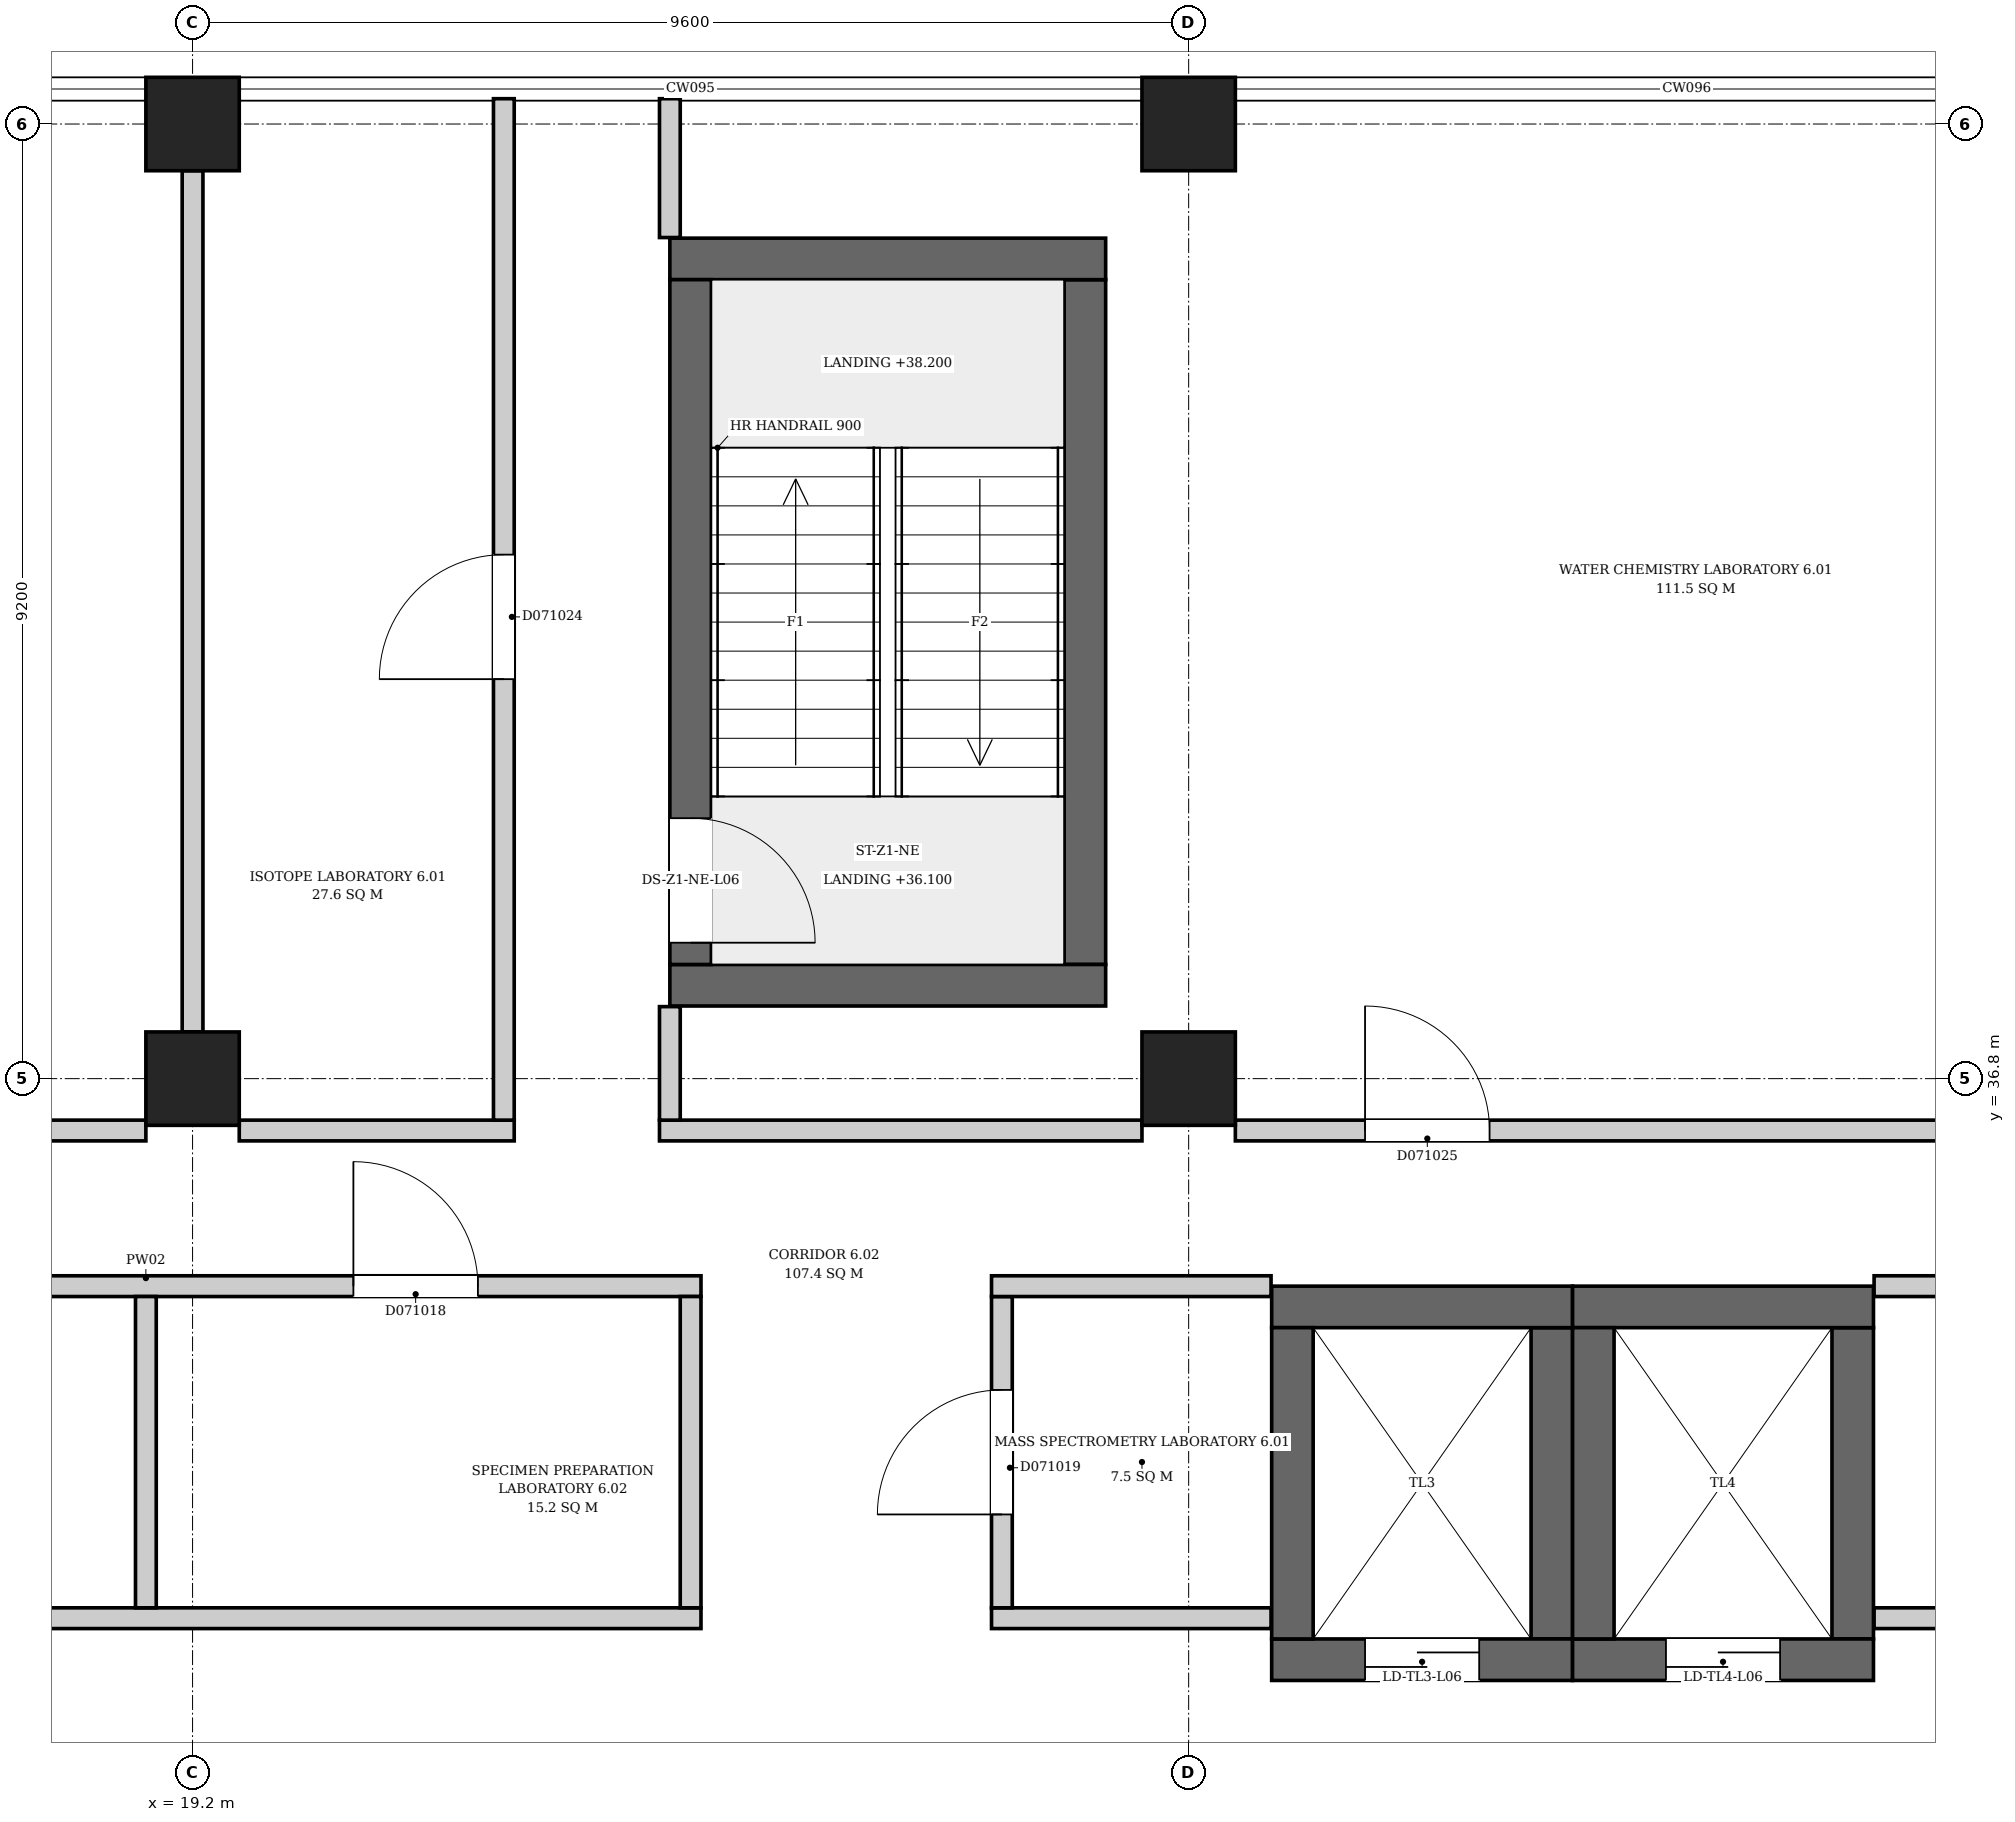
"""IFC4 building model, lengths in metres.
Left out: names, types, materials, properties, quantities, classifications, styles, units other than length and angle.
Written with IfcOpenShell. Run it as: python <this file> out.ifc"""

import sys

from ifc_helpers import new_model, si_unit, direction, frame, frame_2d, origin, origin_2d, place, context, subcontext, project, spatial, rectangle, extrude, element, fill, save


model = new_model("IFC4")
c1 = context("Model", 3, precision=1e-05, world=origin(), true_north=direction((0.0, 1.0)))
c2 = subcontext(c1, "Body", "Model", "MODEL_VIEW")
j1 = project(units=[si_unit("LENGTHUNIT", "METRE"), si_unit("PLANEANGLEUNIT", "RADIAN")], contexts=[c1])
p1 = place(None, origin())
s1 = spatial("IfcSite", under=j1, at=p1, CompositionType="ELEMENT")
p2 = place(p1, origin())
s2 = spatial("IfcBuilding", under=s1, at=p2, CompositionType="ELEMENT")
p3 = place(p2, frame((0.0, 0.0, 36.1)))
s3 = spatial("IfcBuildingStorey", under=s2, at=p3, CompositionType="ELEMENT", Elevation=36.1)
for number, where, z_axis, x_axis in (
    (1, (23.8, 37.7, 0.0), (0.0, 0.0, 1.0), (1.0, 0.0, 0.0)),
    (2, (23.8, 44.7, 0.0), (0.0, 0.0, 1.0), (1.0, 0.0, 0.0)),
):
    element("IfcWall", number, at=place(p3, frame(where, z_axis=z_axis, x_axis=x_axis)), inside=s3, PredefinedType="SHEAR", context=c2, shape_type="SweptSolid", body=[
        extrude(rectangle(XDim=4.2, YDim=0.4, at=frame_2d((2.1, 0.0))), origin(), (0.0, 0.0, 1.0), 4.2),
    ])
p4 = place(p3, frame((24.0, 37.9, 0.0), z_axis=(0.0, 0.0, 1.0), x_axis=(0.0, 1.0, 0.0)))
e3 = element("IfcWall", 3, at=p4, inside=s3, PredefinedType="SHEAR", context=c2, shape_type="SweptSolid", body=[
    extrude(rectangle(XDim=6.6, YDim=0.4, at=frame_2d((3.3, 0.0))), origin(), (0.0, 0.0, 1.0), 4.2),
])
p5 = place(p4, frame((0.21, 0.0, 0.0)))
e4 = element("IfcOpeningElement", 4, at=p5, cuts=e3, PredefinedType="OPENING", context=c2, shape_type="SweptSolid", body=[
    extrude(rectangle(XDim=1.2, YDim=2.1, at=frame_2d((0.6, 1.05))), frame((0.0, 0.21, 0.0), z_axis=(0.0, -1.0, 0.0), x_axis=(1.0, 0.0, 0.0)), (0.0, 0.0, 1.0), 0.42),
])
p6 = place(p3, frame((27.8, 37.9, 0.0), z_axis=(0.0, 0.0, 1.0), x_axis=(0.0, 1.0, 0.0)))
e5 = element("IfcWall", 5, at=p6, inside=s3, PredefinedType="SHEAR", context=c2, shape_type="SweptSolid", body=[
    extrude(rectangle(XDim=6.6, YDim=0.4, at=frame_2d((3.3, 0.0))), origin(), (0.0, 0.0, 1.0), 4.2),
])
p7 = place(p3, frame((29.6, 31.2, 0.0), z_axis=(0.0, 0.0, 1.0), x_axis=(1.0, 0.0, 0.0)))
e6 = element("IfcWall", 6, at=p7, inside=s3, PredefinedType="SHEAR", context=c2, shape_type="SweptSolid", body=[
    extrude(rectangle(XDim=2.9, YDim=0.4, at=frame_2d((1.45, 0.0))), origin(), (0.0, 0.0, 1.0), 4.2),
])
p8 = place(p7, frame((0.9, 0.0, 0.0)))
e7 = element("IfcOpeningElement", 7, at=p8, cuts=e6, PredefinedType="OPENING", context=c2, shape_type="SweptSolid", body=[
    extrude(rectangle(XDim=1.1, YDim=2.1, at=frame_2d((0.55, 1.05))), frame((0.0, 0.21, 0.0), z_axis=(0.0, -1.0, 0.0), x_axis=(1.0, 0.0, 0.0)), (0.0, 0.0, 1.0), 0.42),
])
p9 = place(p3, frame((29.6, 34.6, 0.0), z_axis=(0.0, 0.0, 1.0), x_axis=(1.0, 0.0, 0.0)))
e8 = element("IfcWall", 8, at=p9, inside=s3, PredefinedType="SHEAR", context=c2, shape_type="SweptSolid", body=[
    extrude(rectangle(XDim=2.9, YDim=0.4, at=frame_2d((1.45, 0.0))), origin(), (0.0, 0.0, 1.0), 4.2),
])
for number, where, z_axis, x_axis in (
    (9, (29.8, 31.4, 0.0), (0.0, 0.0, 1.0), (0.0, 1.0, 0.0)),
    (10, (32.3, 31.4, 0.0), (0.0, 0.0, 1.0), (0.0, 1.0, 0.0)),
):
    element("IfcWall", number, at=place(p3, frame(where, z_axis=z_axis, x_axis=x_axis)), inside=s3, PredefinedType="SHEAR", context=c2, shape_type="SweptSolid", body=[
        extrude(rectangle(XDim=3.0, YDim=0.4, at=frame_2d((1.5, 0.0))), origin(), (0.0, 0.0, 1.0), 4.2),
    ])
p10 = place(p3, frame((32.5, 31.2, 0.0), z_axis=(0.0, 0.0, 1.0), x_axis=(1.0, 0.0, 0.0)))
e11 = element("IfcWall", 11, at=p10, inside=s3, PredefinedType="SHEAR", context=c2, shape_type="SweptSolid", body=[
    extrude(rectangle(XDim=2.9, YDim=0.4, at=frame_2d((1.45, 0.0))), origin(), (0.0, 0.0, 1.0), 4.2),
])
p11 = place(p10, frame((0.9, 0.0, 0.0)))
e12 = element("IfcOpeningElement", 12, at=p11, cuts=e11, PredefinedType="OPENING", context=c2, shape_type="SweptSolid", body=[
    extrude(rectangle(XDim=1.1, YDim=2.1, at=frame_2d((0.55, 1.05))), frame((0.0, 0.21, 0.0), z_axis=(0.0, -1.0, 0.0), x_axis=(1.0, 0.0, 0.0)), (0.0, 0.0, 1.0), 0.42),
])
p12 = place(p3, frame((32.5, 34.6, 0.0), z_axis=(0.0, 0.0, 1.0), x_axis=(1.0, 0.0, 0.0)))
e13 = element("IfcWall", 13, at=p12, inside=s3, PredefinedType="SHEAR", context=c2, shape_type="SweptSolid", body=[
    extrude(rectangle(XDim=2.9, YDim=0.4, at=frame_2d((1.45, 0.0))), origin(), (0.0, 0.0, 1.0), 4.2),
])
for number, where, z_axis, x_axis in (
    (14, (32.7, 31.4, 0.0), (0.0, 0.0, 1.0), (0.0, 1.0, 0.0)),
    (15, (35.2, 31.4, 0.0), (0.0, 0.0, 1.0), (0.0, 1.0, 0.0)),
):
    element("IfcWall", number, at=place(p3, frame(where, z_axis=z_axis, x_axis=x_axis)), inside=s3, PredefinedType="SHEAR", context=c2, shape_type="SweptSolid", body=[
        extrude(rectangle(XDim=3.0, YDim=0.4, at=frame_2d((1.5, 0.0))), origin(), (0.0, 0.0, 1.0), 4.2),
    ])
for number, where, z_axis, x_axis in (
    (16, (19.2, 36.8, 0.0), (0.0, 0.0, 1.0), (1.0, 0.0, 0.0)),
    (17, (28.8, 36.8, 0.0), (0.0, 0.0, 1.0), (1.0, 0.0, 0.0)),
    (18, (19.2, 46.0, 0.0), (0.0, 0.0, 1.0), (1.0, 0.0, 0.0)),
    (19, (28.8, 46.0, 0.0), (0.0, 0.0, 1.0), (1.0, 0.0, 0.0)),
):
    element("IfcColumn", number, at=place(p3, frame(where, z_axis=z_axis, x_axis=x_axis)), inside=s3, PredefinedType="COLUMN", context=c2, shape_type="SweptSolid", body=[
        extrude(rectangle(XDim=0.9, YDim=0.9, at=origin_2d()), origin(), (0.0, 0.0, 1.0), 4.2),
    ])
p13 = place(p3, frame((11.2, 36.3, 0.0), z_axis=(0.0, 0.0, 1.0), x_axis=(1.0, 0.0, 0.0)))
e20 = element("IfcWall", 20, at=p13, inside=s3, PredefinedType="PARTITIONING", context=c2, shape_type="SweptSolid", body=[
    extrude(rectangle(XDim=7.55, YDim=0.2, at=frame_2d((3.775, 0.0))), origin(), (0.0, 0.0, 1.0), 3.9),
])
p14 = place(p3, frame((13.4, 34.8, 0.0), z_axis=(0.0, 0.0, 1.0), x_axis=(1.0, 0.0, 0.0)))
e21 = element("IfcWall", 21, at=p14, inside=s3, PredefinedType="PARTITIONING", context=c2, shape_type="SweptSolid", body=[
    extrude(rectangle(XDim=10.7, YDim=0.2, at=frame_2d((5.35, 0.0))), origin(), (0.0, 0.0, 1.0), 3.9),
])
p15 = place(p14, frame((2.1, 0.0, 0.0)))
e22 = element("IfcOpeningElement", 22, at=p15, cuts=e21, PredefinedType="OPENING", context=c2, shape_type="SweptSolid", body=[
    extrude(rectangle(XDim=1.2, YDim=2.1, at=frame_2d((0.6, 1.05))), frame((0.0, 0.11, 0.0), z_axis=(0.0, -1.0, 0.0), x_axis=(1.0, 0.0, 0.0)), (0.0, 0.0, 1.0), 0.22),
])
p16 = place(p14, frame((7.35, 0.0, 0.0)))
e23 = element("IfcOpeningElement", 23, at=p16, cuts=e21, PredefinedType="OPENING", context=c2, shape_type="SweptSolid", body=[
    extrude(rectangle(XDim=1.2, YDim=2.1, at=frame_2d((0.6, 1.05))), frame((0.0, 0.11, 0.0), z_axis=(0.0, -1.0, 0.0), x_axis=(1.0, 0.0, 0.0)), (0.0, 0.0, 1.0), 0.22),
])
p17 = place(p3, frame((13.506, 31.6, 0.0), z_axis=(0.0, 0.0, 1.0), x_axis=(1.0, 0.0, 0.0)))
e24 = element("IfcWall", 24, at=p17, inside=s3, PredefinedType="PARTITIONING", context=c2, shape_type="SweptSolid", body=[
    extrude(rectangle(XDim=10.594, YDim=0.2, at=frame_2d((5.297, 0.0))), origin(), (0.0, 0.0, 1.0), 3.9),
])
p18 = place(p3, frame((18.75, 31.7, 0.0), z_axis=(0.0, 0.0, 1.0), x_axis=(0.0, 1.0, 0.0)))
e25 = element("IfcWall", 25, at=p18, inside=s3, PredefinedType="PARTITIONING", context=c2, shape_type="SweptSolid", body=[
    extrude(rectangle(XDim=3.0, YDim=0.2, at=frame_2d((1.5, 0.0))), origin(), (0.0, 0.0, 1.0), 3.9),
])
p19 = place(p3, frame((19.2, 37.25, 0.0), z_axis=(0.0, 0.0, 1.0), x_axis=(0.0, 1.0, 0.0)))
e26 = element("IfcWall", 26, at=p19, inside=s3, PredefinedType="PARTITIONING", context=c2, shape_type="SweptSolid", body=[
    extrude(rectangle(XDim=8.3, YDim=0.2, at=frame_2d((4.15, 0.0))), origin(), (0.0, 0.0, 1.0), 3.9),
])
p20 = place(p3, frame((19.65, 36.3, 0.0), z_axis=(0.0, 0.0, 1.0), x_axis=(1.0, 0.0, 0.0)))
e27 = element("IfcWall", 27, at=p20, inside=s3, PredefinedType="PARTITIONING", context=c2, shape_type="SweptSolid", body=[
    extrude(rectangle(XDim=2.65, YDim=0.2, at=frame_2d((1.325, 0.0))), origin(), (0.0, 0.0, 1.0), 3.9),
])
p21 = place(p3, frame((22.2, 36.4, 0.0), z_axis=(0.0, 0.0, 1.0), x_axis=(0.0, 1.0, 0.0)))
e28 = element("IfcWall", 28, at=p21, inside=s3, PredefinedType="PARTITIONING", context=c2, shape_type="SweptSolid", body=[
    extrude(rectangle(XDim=9.844, YDim=0.2, at=frame_2d((4.922, 0.0))), origin(), (0.0, 0.0, 1.0), 3.9),
])
p22 = place(p21, frame((4.25, 0.0, 0.0)))
e29 = element("IfcOpeningElement", 29, at=p22, cuts=e28, PredefinedType="OPENING", context=c2, shape_type="SweptSolid", body=[
    extrude(rectangle(XDim=1.2, YDim=2.1, at=frame_2d((0.6, 1.05))), frame((0.0, 0.11, 0.0), z_axis=(0.0, -1.0, 0.0), x_axis=(1.0, 0.0, 0.0)), (0.0, 0.0, 1.0), 0.22),
])
p23 = place(p3, frame((23.7, 36.3, 0.0), z_axis=(0.0, 0.0, 1.0), x_axis=(1.0, 0.0, 0.0)))
e30 = element("IfcWall", 30, at=p23, inside=s3, PredefinedType="PARTITIONING", context=c2, shape_type="SweptSolid", body=[
    extrude(rectangle(XDim=4.65, YDim=0.2, at=frame_2d((2.325, 0.0))), origin(), (0.0, 0.0, 1.0), 3.9),
])
p24 = place(p3, frame((23.8, 36.4, 0.0), z_axis=(0.0, 0.0, 1.0), x_axis=(0.0, 1.0, 0.0)))
e31 = element("IfcWall", 31, at=p24, inside=s3, PredefinedType="PARTITIONING", context=c2, shape_type="SweptSolid", body=[
    extrude(rectangle(XDim=1.094, YDim=0.2, at=frame_2d((0.547, 0.0))), origin(), (0.0, 0.0, 1.0), 3.9),
])
p25 = place(p3, frame((23.8, 44.906, 0.0), z_axis=(0.0, 0.0, 1.0), x_axis=(0.0, 1.0, 0.0)))
e32 = element("IfcWall", 32, at=p25, inside=s3, PredefinedType="PARTITIONING", context=c2, shape_type="SweptSolid", body=[
    extrude(rectangle(XDim=1.338, YDim=0.2, at=frame_2d((0.669, 0.0))), origin(), (0.0, 0.0, 1.0), 3.9),
])
p26 = place(p3, frame((24.0, 31.7, 0.0), z_axis=(0.0, 0.0, 1.0), x_axis=(0.0, 1.0, 0.0)))
e33 = element("IfcWall", 33, at=p26, inside=s3, PredefinedType="PARTITIONING", context=c2, shape_type="SweptSolid", body=[
    extrude(rectangle(XDim=3.0, YDim=0.2, at=frame_2d((1.5, 0.0))), origin(), (0.0, 0.0, 1.0), 3.9),
])
p27 = place(p3, frame((26.9, 31.6, 0.0), z_axis=(0.0, 0.0, 1.0), x_axis=(1.0, 0.0, 0.0)))
e34 = element("IfcWall", 34, at=p27, inside=s3, PredefinedType="PARTITIONING", context=c2, shape_type="SweptSolid", body=[
    extrude(rectangle(XDim=2.694, YDim=0.2, at=frame_2d((1.347, 0.0))), origin(), (0.0, 0.0, 1.0), 3.9),
])
p28 = place(p3, frame((27.0, 31.7, 0.0), z_axis=(0.0, 0.0, 1.0), x_axis=(0.0, 1.0, 0.0)))
e35 = element("IfcWall", 35, at=p28, inside=s3, PredefinedType="PARTITIONING", context=c2, shape_type="SweptSolid", body=[
    extrude(rectangle(XDim=3.0, YDim=0.2, at=frame_2d((1.5, 0.0))), origin(), (0.0, 0.0, 1.0), 3.9),
])
p29 = place(p28, frame((0.9, 0.0, 0.0)))
e36 = element("IfcOpeningElement", 36, at=p29, cuts=e35, PredefinedType="OPENING", context=c2, shape_type="SweptSolid", body=[
    extrude(rectangle(XDim=1.2, YDim=2.1, at=frame_2d((0.6, 1.05))), frame((0.0, 0.11, 0.0), z_axis=(0.0, -1.0, 0.0), x_axis=(1.0, 0.0, 0.0)), (0.0, 0.0, 1.0), 0.22),
])
p30 = place(p3, frame((26.9, 34.8, 0.0), z_axis=(0.0, 0.0, 1.0), x_axis=(1.0, 0.0, 0.0)))
e37 = element("IfcWall", 37, at=p30, inside=s3, PredefinedType="PARTITIONING", context=c2, shape_type="SweptSolid", body=[
    extrude(rectangle(XDim=2.694, YDim=0.2, at=frame_2d((1.347, 0.0))), origin(), (0.0, 0.0, 1.0), 3.9),
])
p31 = place(p3, frame((29.25, 36.3, 0.0), z_axis=(0.0, 0.0, 1.0), x_axis=(1.0, 0.0, 0.0)))
e38 = element("IfcWall", 38, at=p31, inside=s3, PredefinedType="PARTITIONING", context=c2, shape_type="SweptSolid", body=[
    extrude(rectangle(XDim=8.7, YDim=0.2, at=frame_2d((4.35, 0.0))), origin(), (0.0, 0.0, 1.0), 3.9),
])
p32 = place(p31, frame((1.25, 0.0, 0.0)))
e39 = element("IfcOpeningElement", 39, at=p32, cuts=e38, PredefinedType="OPENING", context=c2, shape_type="SweptSolid", body=[
    extrude(rectangle(XDim=1.2, YDim=2.1, at=frame_2d((0.6, 1.05))), frame((0.0, 0.11, 0.0), z_axis=(0.0, -1.0, 0.0), x_axis=(1.0, 0.0, 0.0)), (0.0, 0.0, 1.0), 0.22),
])
p33 = place(p3, frame((35.406, 31.6, 0.0), z_axis=(0.0, 0.0, 1.0), x_axis=(1.0, 0.0, 0.0)))
e40 = element("IfcWall", 40, at=p33, inside=s3, PredefinedType="PARTITIONING", context=c2, shape_type="SweptSolid", body=[
    extrude(rectangle(XDim=12.788, YDim=0.2, at=frame_2d((6.394, 0.0))), origin(), (0.0, 0.0, 1.0), 3.9),
])
p34 = place(p3, frame((35.406, 34.8, 0.0), z_axis=(0.0, 0.0, 1.0), x_axis=(1.0, 0.0, 0.0)))
e41 = element("IfcWall", 41, at=p34, inside=s3, PredefinedType="PARTITIONING", context=c2, shape_type="SweptSolid", body=[
    extrude(rectangle(XDim=12.788, YDim=0.2, at=frame_2d((6.394, 0.0))), origin(), (0.0, 0.0, 1.0), 3.9),
])
p35 = place(p34, frame((2.744, 0.0, 0.0)))
e42 = element("IfcOpeningElement", 42, at=p35, cuts=e41, PredefinedType="OPENING", context=c2, shape_type="SweptSolid", body=[
    extrude(rectangle(XDim=0.9, YDim=2.1, at=frame_2d((0.45, 1.05))), frame((0.0, 0.11, 0.0), z_axis=(0.0, -1.0, 0.0), x_axis=(1.0, 0.0, 0.0)), (0.0, 0.0, 1.0), 0.22),
])
p36 = place(p34, frame((9.144, 0.0, 0.0)))
e43 = element("IfcOpeningElement", 43, at=p36, cuts=e41, PredefinedType="OPENING", context=c2, shape_type="SweptSolid", body=[
    extrude(rectangle(XDim=0.9, YDim=2.1, at=frame_2d((0.45, 1.05))), frame((0.0, 0.11, 0.0), z_axis=(0.0, -1.0, 0.0), x_axis=(1.0, 0.0, 0.0)), (0.0, 0.0, 1.0), 0.22),
])
p37 = place(p5, origin())
e44 = element("IfcDoor", 44, at=p37, inside=s3, OperationType="SINGLE_SWING_LEFT", PredefinedType="DOOR", context=c2, shape_type="SweptSolid", body=[
    extrude(rectangle(XDim=1.2, YDim=2.1, at=frame_2d((0.6, 1.05))), frame((0.0, 0.025, 0.0), z_axis=(0.0, -1.0, 0.0), x_axis=(1.0, 0.0, 0.0)), (0.0, 0.0, 1.0), 0.05),
])
fill(e4, e44)
p38 = place(p8, origin())
e45 = element("IfcDoor", 45, at=p38, inside=s3, OperationType="DOUBLE_DOOR_SLIDING", PredefinedType="DOOR", context=c2, shape_type="SweptSolid", body=[
    extrude(rectangle(XDim=1.1, YDim=2.1, at=frame_2d((0.55, 1.05))), frame((0.0, 0.025, 0.0), z_axis=(0.0, -1.0, 0.0), x_axis=(1.0, 0.0, 0.0)), (0.0, 0.0, 1.0), 0.05),
])
fill(e7, e45)
p39 = place(p11, origin())
e46 = element("IfcDoor", 46, at=p39, inside=s3, OperationType="DOUBLE_DOOR_SLIDING", PredefinedType="DOOR", context=c2, shape_type="SweptSolid", body=[
    extrude(rectangle(XDim=1.1, YDim=2.1, at=frame_2d((0.55, 1.05))), frame((0.0, 0.025, 0.0), z_axis=(0.0, -1.0, 0.0), x_axis=(1.0, 0.0, 0.0)), (0.0, 0.0, 1.0), 0.05),
])
fill(e12, e46)
p40 = place(p16, origin())
e47 = element("IfcDoor", 47, at=p40, inside=s3, OperationType="SINGLE_SWING_LEFT", PredefinedType="DOOR", context=c2, shape_type="SweptSolid", body=[
    extrude(rectangle(XDim=1.2, YDim=2.1, at=frame_2d((0.6, 1.05))), frame((0.0, 0.025, 0.0), z_axis=(0.0, -1.0, 0.0), x_axis=(1.0, 0.0, 0.0)), (0.0, 0.0, 1.0), 0.05),
])
fill(e23, e47)
p41 = place(p29, origin())
e48 = element("IfcDoor", 48, at=p41, inside=s3, OperationType="SINGLE_SWING_RIGHT", PredefinedType="DOOR", context=c2, shape_type="SweptSolid", body=[
    extrude(rectangle(XDim=1.2, YDim=2.1, at=frame_2d((0.6, 1.05))), frame((0.0, 0.025, 0.0), z_axis=(0.0, -1.0, 0.0), x_axis=(1.0, 0.0, 0.0)), (0.0, 0.0, 1.0), 0.05),
])
fill(e36, e48)
p42 = place(p22, origin())
e49 = element("IfcDoor", 49, at=p42, inside=s3, OperationType="SINGLE_SWING_RIGHT", PredefinedType="DOOR", context=c2, shape_type="SweptSolid", body=[
    extrude(rectangle(XDim=1.2, YDim=2.1, at=frame_2d((0.6, 1.05))), frame((0.0, 0.025, 0.0), z_axis=(0.0, -1.0, 0.0), x_axis=(1.0, 0.0, 0.0)), (0.0, 0.0, 1.0), 0.05),
])
fill(e29, e49)
p43 = place(p32, origin())
e50 = element("IfcDoor", 50, at=p43, inside=s3, OperationType="SINGLE_SWING_LEFT", PredefinedType="DOOR", context=c2, shape_type="SweptSolid", body=[
    extrude(rectangle(XDim=1.2, YDim=2.1, at=frame_2d((0.6, 1.05))), frame((0.0, 0.025, 0.0), z_axis=(0.0, -1.0, 0.0), x_axis=(1.0, 0.0, 0.0)), (0.0, 0.0, 1.0), 0.05),
])
fill(e39, e50)
save(model, sys.argv[1])
